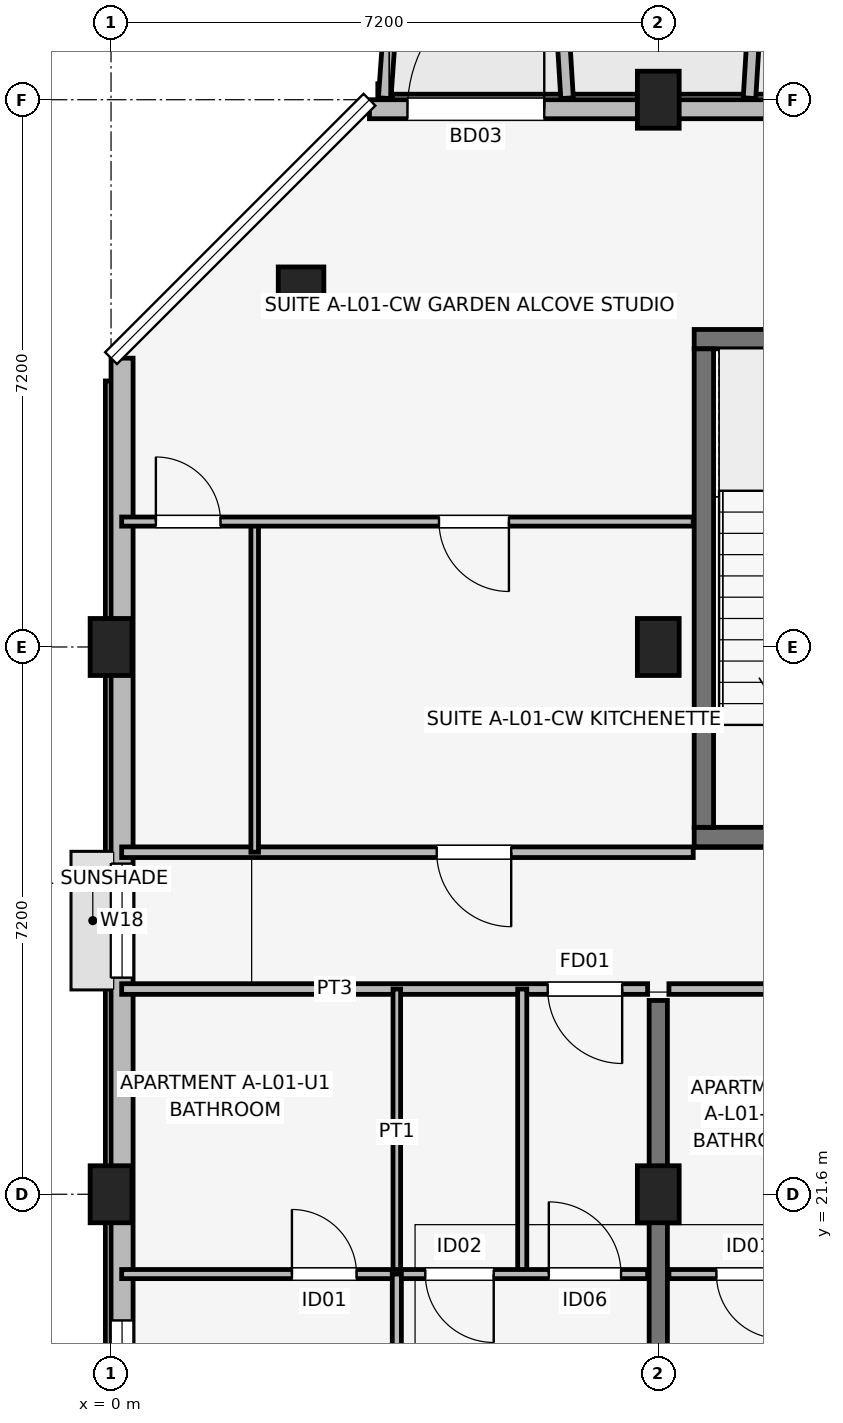
"""IFC4 building model, lengths in metres.
Left out: names, types, materials, properties, quantities, classifications, styles, units other than length and angle.
Written with IfcOpenShell. Run it as: python <this file> out.ifc"""

import sys

from ifc_helpers import new_model, si_unit, direction, frame, frame_2d, origin, origin_2d, place, context, subcontext, project, spatial, rectangle, extrude, element, fill, save


model = new_model("IFC4")
c1 = context("Model", 3, precision=1e-05, world=origin(), true_north=direction((0.0, 1.0)))
c2 = subcontext(c1, "Body", "Model", "MODEL_VIEW")
j1 = project(units=[si_unit("LENGTHUNIT", "METRE"), si_unit("PLANEANGLEUNIT", "RADIAN")], contexts=[c1])
p1 = place(None, origin())
s1 = spatial("IfcSite", under=j1, at=p1, CompositionType="ELEMENT")
p2 = place(p1, origin())
s2 = spatial("IfcBuilding", under=s1, at=p2, CompositionType="ELEMENT")
p3 = place(p2, frame((0.0, 0.0, 4.5)))
s3 = spatial("IfcBuildingStorey", under=s2, at=p3, CompositionType="ELEMENT", Elevation=4.5)
for number, where, z_axis, x_axis in (
    (1, (0.0, 21.6, 0.0), (0.0, 0.0, 1.0), (1.0, 0.0, 0.0)),
    (2, (0.0, 28.8, 0.0), (0.0, 0.0, 1.0), (1.0, 0.0, 0.0)),
):
    element("IfcColumn", number, at=place(p3, frame(where, z_axis=z_axis, x_axis=x_axis)), inside=s3, PredefinedType="COLUMN", context=c2, shape_type="SweptSolid", body=[
        extrude(rectangle(XDim=0.55, YDim=0.75, at=origin_2d()), origin(), (0.0, 0.0, 1.0), 4.2),
    ])
p4 = place(p3, frame((2.5, 33.5, 0.0), z_axis=(0.0, 0.0, 1.0), x_axis=(1.0, 0.0, 0.0)))
e3 = element("IfcColumn", 3, at=p4, inside=s3, PredefinedType="COLUMN", context=c2, shape_type="SweptSolid", body=[
    extrude(rectangle(XDim=0.6, YDim=0.6, at=origin_2d()), origin(), (0.0, 0.0, 1.0), 4.2),
])
for number, where, z_axis, x_axis in (
    (4, (7.2, 21.6, 0.0), (0.0, 0.0, 1.0), (1.0, 0.0, 0.0)),
    (5, (7.2, 28.8, 0.0), (0.0, 0.0, 1.0), (1.0, 0.0, 0.0)),
    (6, (7.2, 36.0, 0.0), (0.0, 0.0, 1.0), (1.0, 0.0, 0.0)),
):
    element("IfcColumn", number, at=place(p3, frame(where, z_axis=z_axis, x_axis=x_axis)), inside=s3, PredefinedType="COLUMN", context=c2, shape_type="SweptSolid", body=[
        extrude(rectangle(XDim=0.55, YDim=0.75, at=origin_2d()), origin(), (0.0, 0.0, 1.0), 4.2),
    ])
p5 = place(p3, frame((7.673, 26.3, 0.0), z_axis=(0.0, 0.0, 1.0), x_axis=(1.0, 0.0, 0.0)))
e7 = element("IfcWall", 7, at=p5, inside=s3, PredefinedType="SHEAR", context=c2, shape_type="SweptSolid", body=[
    extrude(rectangle(XDim=3.305, YDim=0.255, at=frame_2d((1.652, 0.0))), origin(), (0.0, 0.0, 1.0), 4.2),
])
p6 = place(p5, frame((2.177, 0.0, 0.0), z_axis=(0.0, 0.0, 1.0), x_axis=(-1.0, 0.0, 0.0)))
e8 = element("IfcOpeningElement", 8, at=p6, cuts=e7, PredefinedType="OPENING", context=c2, shape_type="SweptSolid", body=[
    extrude(rectangle(XDim=1.05, YDim=2.12, at=frame_2d((0.525, 1.06))), frame((0.0, 0.137, 0.0), z_axis=(0.0, -1.0, 0.0), x_axis=(1.0, 0.0, 0.0)), (0.0, 0.0, 1.0), 0.275),
])
p7 = place(p3, frame((7.673, 32.85, 0.0), z_axis=(0.0, 0.0, 1.0), x_axis=(1.0, 0.0, 0.0)))
e9 = element("IfcWall", 9, at=p7, inside=s3, PredefinedType="SHEAR", context=c2, shape_type="SweptSolid", body=[
    extrude(rectangle(XDim=3.305, YDim=0.255, at=frame_2d((1.652, 0.0))), origin(), (0.0, 0.0, 1.0), 4.2),
])
p8 = place(p3, frame((7.8, 26.427, 0.0), z_axis=(0.0, 0.0, 1.0), x_axis=(0.0, 1.0, 0.0)))
e10 = element("IfcWall", 10, at=p8, inside=s3, PredefinedType="SHEAR", context=c2, shape_type="SweptSolid", body=[
    extrude(rectangle(XDim=6.295, YDim=0.255, at=frame_2d((3.147, 0.0))), origin(), (0.0, 0.0, 1.0), 4.2),
])
p9 = place(p3, frame((7.2, 14.75, 0.0), z_axis=(0.0, 0.0, 1.0), x_axis=(0.0, 1.0, 0.0)))
e11 = element("IfcWall", 11, at=p9, inside=s3, PredefinedType="SHEAR", context=c2, shape_type="SweptSolid", body=[
    extrude(rectangle(XDim=9.4, YDim=0.24, at=frame_2d((4.7, 0.0))), origin(), (0.0, 0.0, 1.0), 4.2),
])
p10 = place(p3, frame((32.6, 35.875, 0.0), z_axis=(0.0, 0.0, 1.0), x_axis=(-1.0, 0.0, 0.0)))
e12 = element("IfcWall", 12, at=p10, inside=s3, PredefinedType="SOLIDWALL", context=c2, shape_type="SweptSolid", body=[
    extrude(rectangle(XDim=29.2, YDim=0.25, at=frame_2d((14.6, 0.0))), origin(), (0.0, 0.0, 1.0), 3.48),
])
p11 = place(p10, frame((28.7, 0.0, 0.0), z_axis=(0.0, 0.0, 1.0), x_axis=(-1.0, 0.0, 0.0)))
e13 = element("IfcOpeningElement", 13, at=p11, cuts=e12, PredefinedType="OPENING", context=c2, shape_type="SweptSolid", body=[
    extrude(rectangle(XDim=1.8, YDim=2.15, at=frame_2d((0.9, 1.075))), frame((0.0, 0.135, 0.0), z_axis=(0.0, -1.0, 0.0), x_axis=(1.0, 0.0, 0.0)), (0.0, 0.0, 1.0), 0.27),
])
p12 = place(p10, frame((2.15, 0.0, 0.0), z_axis=(0.0, 0.0, 1.0), x_axis=(-1.0, 0.0, 0.0)))
e14 = element("IfcOpeningElement", 14, at=p12, cuts=e12, PredefinedType="OPENING", context=c2, shape_type="SweptSolid", body=[
    extrude(rectangle(XDim=1.5, YDim=2.15, at=frame_2d((0.75, 1.075))), frame((0.0, 0.135, 0.0), z_axis=(0.0, -1.0, 0.0), x_axis=(1.0, 0.0, 0.0)), (0.0, 0.0, 1.0), 0.27),
])
p13 = place(p10, frame((14.955, 0.0, 0.5)))
e15 = element("IfcOpeningElement", 15, at=p13, cuts=e12, PredefinedType="OPENING", context=c2, shape_type="SweptSolid", body=[
    extrude(rectangle(XDim=0.9, YDim=1.8, at=frame_2d((0.45, 0.9))), frame((0.0, 0.135, 0.0), z_axis=(0.0, -1.0, 0.0), x_axis=(1.0, 0.0, 0.0)), (0.0, 0.0, 1.0), 0.27),
])
p14 = place(p10, frame((7.675, 0.0, 0.7)))
e16 = element("IfcOpeningElement", 16, at=p14, cuts=e12, PredefinedType="OPENING", context=c2, shape_type="SweptSolid", body=[
    extrude(rectangle(XDim=2.0, YDim=1.65, at=frame_2d((1.0, 0.825))), frame((0.0, 0.135, 0.0), z_axis=(0.0, -1.0, 0.0), x_axis=(1.0, 0.0, 0.0)), (0.0, 0.0, 1.0), 0.27),
])
p15 = place(p10, frame((19.57, 0.0, 0.7)))
e17 = element("IfcOpeningElement", 17, at=p15, cuts=e12, PredefinedType="OPENING", context=c2, shape_type="SweptSolid", body=[
    extrude(rectangle(XDim=1.86, YDim=1.6, at=frame_2d((0.93, 0.8))), frame((0.0, 0.135, 0.0), z_axis=(0.0, -1.0, 0.0), x_axis=(1.0, 0.0, 0.0)), (0.0, 0.0, 1.0), 0.27),
])
p16 = place(p3, frame((0.145, 32.6, 0.0), z_axis=(0.0, 0.0, 1.0), x_axis=(0.0, -1.0, 0.0)))
e18 = element("IfcWall", 18, at=p16, inside=s3, PredefinedType="SOLIDWALL", context=c2, shape_type="SweptSolid", body=[
    extrude(rectangle(XDim=14.8, YDim=0.29, at=frame_2d((7.4, 0.0))), origin(), (0.0, 0.0, 1.0), 3.43),
])
p17 = place(p16, frame((6.65, 0.0, 1.05)))
e19 = element("IfcOpeningElement", 19, at=p17, cuts=e18, PredefinedType="OPENING", context=c2, shape_type="SweptSolid", body=[
    extrude(rectangle(XDim=1.5, YDim=1.15, at=frame_2d((0.75, 0.575))), frame((0.0, 0.155, 0.0), z_axis=(0.0, -1.0, 0.0), x_axis=(1.0, 0.0, 0.0)), (0.0, 0.0, 1.0), 0.31),
])
p18 = place(p16, frame((12.66, 0.0, 0.75)))
e20 = element("IfcOpeningElement", 20, at=p18, cuts=e18, PredefinedType="OPENING", context=c2, shape_type="SweptSolid", body=[
    extrude(rectangle(XDim=1.3, YDim=1.55, at=frame_2d((0.65, 0.775))), frame((0.0, 0.155, 0.0), z_axis=(0.0, -1.0, 0.0), x_axis=(1.0, 0.0, 0.0)), (0.0, 0.0, 1.0), 0.31),
])
p19 = place(p3, frame((3.6, 36.02, 0.0), z_axis=(0.0, 0.0, 1.0), x_axis=(0.071194071069, 0.997462482625, 0.0)))
e21 = element("IfcWall", 21, at=p19, inside=s3, PredefinedType="ELEMENTEDWALL", context=c2, shape_type="SweptSolid", body=[
    extrude(rectangle(XDim=1.965, YDim=0.165, at=frame_2d((0.982, 0.0))), origin(), (0.0, 0.0, 1.0), 4.0),
])
p20 = place(p3, frame((6.0, 36.02, 0.0), z_axis=(0.0, 0.0, 1.0), x_axis=(-0.061170732449, 0.998127317276, 0.0)))
e22 = element("IfcWall", 22, at=p20, inside=s3, PredefinedType="ELEMENTEDWALL", context=c2, shape_type="SweptSolid", body=[
    extrude(rectangle(XDim=1.964, YDim=0.165, at=frame_2d((0.982, 0.0))), origin(), (0.0, 0.0, 1.0), 4.0),
])
p21 = place(p3, frame((8.4, 36.02, 0.0), z_axis=(0.0, 0.0, 1.0), x_axis=(0.061170732449, 0.998127317276, 0.0)))
e23 = element("IfcWall", 23, at=p21, inside=s3, PredefinedType="ELEMENTEDWALL", context=c2, shape_type="SweptSolid", body=[
    extrude(rectangle(XDim=1.964, YDim=0.165, at=frame_2d((0.982, 0.0))), origin(), (0.0, 0.0, 1.0), 3.58),
])
p22 = place(p3, frame((0.14, 24.3, 0.0), z_axis=(0.0, 0.0, 1.0), x_axis=(1.0, 0.0, 0.0)))
e24 = element("IfcWall", 24, at=p22, inside=s3, PredefinedType="PARTITIONING", context=c2, shape_type="SweptSolid", body=[
    extrude(rectangle(XDim=6.92, YDim=0.14, at=frame_2d((3.46, 0.0))), origin(), (0.0, 0.0, 1.0), 3.25),
])
p23 = place(p22, frame((6.585, 0.0, 0.0), z_axis=(0.0, 0.0, 1.0), x_axis=(-1.0, 0.0, 0.0)))
e25 = element("IfcOpeningElement", 25, at=p23, cuts=e24, PredefinedType="OPENING", context=c2, shape_type="SweptSolid", body=[
    extrude(rectangle(XDim=0.98, YDim=2.1, at=frame_2d((0.49, 1.05))), frame((0.0, 0.08, 0.0), z_axis=(0.0, -1.0, 0.0), x_axis=(1.0, 0.0, 0.0)), (0.0, 0.0, 1.0), 0.16),
])
p24 = place(p3, frame((3.76, 20.55, 0.0), z_axis=(0.0, 0.0, 1.0), x_axis=(0.0, 1.0, 0.0)))
e26 = element("IfcWall", 26, at=p24, inside=s3, PredefinedType="PARTITIONING", context=c2, shape_type="SweptSolid", body=[
    extrude(rectangle(XDim=3.75, YDim=0.1, at=frame_2d((1.875, 0.0))), origin(), (0.0, 0.0, 1.0), 3.25),
])
p25 = place(p3, frame((5.41, 20.55, 0.0), z_axis=(0.0, 0.0, 1.0), x_axis=(0.0, 1.0, 0.0)))
e27 = element("IfcWall", 27, at=p25, inside=s3, PredefinedType="PARTITIONING", context=c2, shape_type="SweptSolid", body=[
    extrude(rectangle(XDim=3.75, YDim=0.12, at=frame_2d((1.875, 0.0))), origin(), (0.0, 0.0, 1.0), 3.25),
])
p26 = place(p3, frame((0.14, 20.55, 0.0), z_axis=(0.0, 0.0, 1.0), x_axis=(1.0, 0.0, 0.0)))
e28 = element("IfcWall", 28, at=p26, inside=s3, PredefinedType="PARTITIONING", context=c2, shape_type="SweptSolid", body=[
    extrude(rectangle(XDim=6.92, YDim=0.12, at=frame_2d((3.46, 0.0))), origin(), (0.0, 0.0, 1.0), 3.25),
])
p27 = place(p26, frame((2.24, 0.0, 0.0)))
e29 = element("IfcOpeningElement", 29, at=p27, cuts=e28, PredefinedType="OPENING", context=c2, shape_type="SweptSolid", body=[
    extrude(rectangle(XDim=0.85, YDim=2.08, at=frame_2d((0.425, 1.04))), frame((0.0, 0.07, 0.0), z_axis=(0.0, -1.0, 0.0), x_axis=(1.0, 0.0, 0.0)), (0.0, 0.0, 1.0), 0.14),
])
p28 = place(p26, frame((4.895, 0.0, 0.0), z_axis=(0.0, 0.0, 1.0), x_axis=(-1.0, 0.0, 0.0)))
e30 = element("IfcOpeningElement", 30, at=p28, cuts=e28, PredefinedType="OPENING", context=c2, shape_type="SweptSolid", body=[
    extrude(rectangle(XDim=0.9, YDim=2.08, at=frame_2d((0.45, 1.04))), frame((0.0, 0.07, 0.0), z_axis=(0.0, -1.0, 0.0), x_axis=(1.0, 0.0, 0.0)), (0.0, 0.0, 1.0), 0.14),
])
p29 = place(p26, frame((5.62, 0.0, 0.0)))
e31 = element("IfcOpeningElement", 31, at=p29, cuts=e28, PredefinedType="OPENING", context=c2, shape_type="SweptSolid", body=[
    extrude(rectangle(XDim=0.95, YDim=2.08, at=frame_2d((0.475, 1.04))), frame((0.0, 0.07, 0.0), z_axis=(0.0, -1.0, 0.0), x_axis=(1.0, 0.0, 0.0)), (0.0, 0.0, 1.0), 0.14),
])
p30 = place(p3, frame((3.76, 14.7, 0.0), z_axis=(0.0, 0.0, 1.0), x_axis=(0.0, 1.0, 0.0)))
e32 = element("IfcWall", 32, at=p30, inside=s3, PredefinedType="PARTITIONING", context=c2, shape_type="SweptSolid", body=[
    extrude(rectangle(XDim=5.85, YDim=0.12, at=frame_2d((2.925, 0.0))), origin(), (0.0, 0.0, 1.0), 3.25),
])
p31 = place(p30, frame((3.375, 0.0, 0.0), z_axis=(0.0, 0.0, 1.0), x_axis=(-1.0, 0.0, 0.0)))
e33 = element("IfcOpeningElement", 33, at=p31, cuts=e32, PredefinedType="OPENING", context=c2, shape_type="SweptSolid", body=[
    extrude(rectangle(XDim=0.9, YDim=2.08, at=frame_2d((0.45, 1.04))), frame((0.0, 0.07, 0.0), z_axis=(0.0, -1.0, 0.0), x_axis=(1.0, 0.0, 0.0)), (0.0, 0.0, 1.0), 0.14),
])
p32 = place(p3, frame((7.34, 24.3, 0.0), z_axis=(0.0, 0.0, 1.0), x_axis=(1.0, 0.0, 0.0)))
e34 = element("IfcWall", 34, at=p32, inside=s3, PredefinedType="PARTITIONING", context=c2, shape_type="SweptSolid", body=[
    extrude(rectangle(XDim=6.92, YDim=0.14, at=frame_2d((3.46, 0.0))), origin(), (0.0, 0.0, 1.0), 3.25),
])
p33 = place(p32, frame((4.995, 0.0, 0.0)))
e35 = element("IfcOpeningElement", 35, at=p33, cuts=e34, PredefinedType="OPENING", context=c2, shape_type="SweptSolid", body=[
    extrude(rectangle(XDim=0.98, YDim=2.1, at=frame_2d((0.49, 1.05))), frame((0.0, 0.08, 0.0), z_axis=(0.0, -1.0, 0.0), x_axis=(1.0, 0.0, 0.0)), (0.0, 0.0, 1.0), 0.16),
])
p34 = place(p3, frame((7.34, 20.55, 0.0), z_axis=(0.0, 0.0, 1.0), x_axis=(1.0, 0.0, 0.0)))
e36 = element("IfcWall", 36, at=p34, inside=s3, PredefinedType="PARTITIONING", context=c2, shape_type="SweptSolid", body=[
    extrude(rectangle(XDim=6.92, YDim=0.12, at=frame_2d((3.46, 0.0))), origin(), (0.0, 0.0, 1.0), 3.25),
])
p35 = place(p34, frame((1.475, 0.0, 0.0), z_axis=(0.0, 0.0, 1.0), x_axis=(-1.0, 0.0, 0.0)))
e37 = element("IfcOpeningElement", 37, at=p35, cuts=e36, PredefinedType="OPENING", context=c2, shape_type="SweptSolid", body=[
    extrude(rectangle(XDim=0.85, YDim=2.08, at=frame_2d((0.425, 1.04))), frame((0.0, 0.07, 0.0), z_axis=(0.0, -1.0, 0.0), x_axis=(1.0, 0.0, 0.0)), (0.0, 0.0, 1.0), 0.14),
])
p36 = place(p34, frame((2.625, 0.0, 0.0)))
e38 = element("IfcOpeningElement", 38, at=p36, cuts=e36, PredefinedType="OPENING", context=c2, shape_type="SweptSolid", body=[
    extrude(rectangle(XDim=0.9, YDim=2.08, at=frame_2d((0.45, 1.04))), frame((0.0, 0.07, 0.0), z_axis=(0.0, -1.0, 0.0), x_axis=(1.0, 0.0, 0.0)), (0.0, 0.0, 1.0), 0.14),
])
p37 = place(p34, frame((5.96, 0.0, 0.0), z_axis=(0.0, 0.0, 1.0), x_axis=(-1.0, 0.0, 0.0)))
e39 = element("IfcOpeningElement", 39, at=p37, cuts=e36, PredefinedType="OPENING", context=c2, shape_type="SweptSolid", body=[
    extrude(rectangle(XDim=0.95, YDim=2.08, at=frame_2d((0.475, 1.04))), frame((0.0, 0.07, 0.0), z_axis=(0.0, -1.0, 0.0), x_axis=(1.0, 0.0, 0.0)), (0.0, 0.0, 1.0), 0.14),
])
p38 = place(p3, frame((0.14, 26.1, 0.0), z_axis=(0.0, 0.0, 1.0), x_axis=(1.0, 0.0, 0.0)))
e40 = element("IfcWall", 40, at=p38, inside=s3, PredefinedType="PARTITIONING", context=c2, shape_type="SweptSolid", body=[
    extrude(rectangle(XDim=7.52, YDim=0.14, at=frame_2d((3.76, 0.0))), origin(), (0.0, 0.0, 1.0), 3.25),
])
p39 = place(p38, frame((5.125, 0.0, 0.0), z_axis=(0.0, 0.0, 1.0), x_axis=(-1.0, 0.0, 0.0)))
e41 = element("IfcOpeningElement", 41, at=p39, cuts=e40, PredefinedType="OPENING", context=c2, shape_type="SweptSolid", body=[
    extrude(rectangle(XDim=0.98, YDim=2.1, at=frame_2d((0.49, 1.05))), frame((0.0, 0.08, 0.0), z_axis=(0.0, -1.0, 0.0), x_axis=(1.0, 0.0, 0.0)), (0.0, 0.0, 1.0), 0.16),
])
p40 = place(p3, frame((1.89, 26.1, 0.0), z_axis=(0.0, 0.0, 1.0), x_axis=(0.0, 1.0, 0.0)))
e42 = element("IfcWall", 42, at=p40, inside=s3, PredefinedType="PARTITIONING", context=c2, shape_type="SweptSolid", body=[
    extrude(rectangle(XDim=4.35, YDim=0.1, at=frame_2d((2.175, 0.0))), origin(), (0.0, 0.0, 1.0), 3.25),
])
p41 = place(p3, frame((0.14, 30.45, 0.0), z_axis=(0.0, 0.0, 1.0), x_axis=(1.0, 0.0, 0.0)))
e43 = element("IfcWall", 43, at=p41, inside=s3, PredefinedType="PARTITIONING", context=c2, shape_type="SweptSolid", body=[
    extrude(rectangle(XDim=7.52, YDim=0.12, at=frame_2d((3.76, 0.0))), origin(), (0.0, 0.0, 1.0), 3.25),
])
p42 = place(p41, frame((0.45, 0.0, 0.0)))
e44 = element("IfcOpeningElement", 44, at=p42, cuts=e43, PredefinedType="OPENING", context=c2, shape_type="SweptSolid", body=[
    extrude(rectangle(XDim=0.85, YDim=2.08, at=frame_2d((0.425, 1.04))), frame((0.0, 0.07, 0.0), z_axis=(0.0, -1.0, 0.0), x_axis=(1.0, 0.0, 0.0)), (0.0, 0.0, 1.0), 0.14),
])
p43 = place(p41, frame((5.095, 0.0, 0.0), z_axis=(0.0, 0.0, 1.0), x_axis=(-1.0, 0.0, 0.0)))
e45 = element("IfcOpeningElement", 45, at=p43, cuts=e43, PredefinedType="OPENING", context=c2, shape_type="SweptSolid", body=[
    extrude(rectangle(XDim=0.92, YDim=2.08, at=frame_2d((0.46, 1.04))), frame((0.0, 0.07, 0.0), z_axis=(0.0, -1.0, 0.0), x_axis=(1.0, 0.0, 0.0)), (0.0, 0.0, 1.0), 0.14),
])
p44 = place(p11, origin())
e46 = element("IfcDoor", 46, at=p44, inside=s3, OperationType="SINGLE_SWING_LEFT", PredefinedType="DOOR", context=c2, shape_type="SweptSolid", body=[
    extrude(rectangle(XDim=1.8, YDim=2.15, at=frame_2d((0.9, 1.075))), frame((0.0, 0.025, 0.0), z_axis=(0.0, -1.0, 0.0), x_axis=(1.0, 0.0, 0.0)), (0.0, 0.0, 1.0), 0.05),
])
fill(e13, e46)
p45 = place(p17, origin())
e47 = element("IfcWindow", 47, at=p45, inside=s3, PartitioningType="SINGLE_PANEL", PredefinedType="WINDOW", context=c2, shape_type="SweptSolid", body=[
    extrude(rectangle(XDim=1.5, YDim=1.15, at=frame_2d((0.75, 0.575))), frame((0.0, 0.03, 0.0), z_axis=(0.0, -1.0, 0.0), x_axis=(1.0, 0.0, 0.0)), (0.0, 0.0, 1.0), 0.06),
])
fill(e19, e47)
p46 = place(p18, origin())
e48 = element("IfcWindow", 48, at=p46, inside=s3, PartitioningType="SINGLE_PANEL", PredefinedType="WINDOW", context=c2, shape_type="SweptSolid", body=[
    extrude(rectangle(XDim=1.3, YDim=1.55, at=frame_2d((0.65, 0.775))), frame((0.0, 0.03, 0.0), z_axis=(0.0, -1.0, 0.0), x_axis=(1.0, 0.0, 0.0)), (0.0, 0.0, 1.0), 0.06),
])
fill(e20, e48)
p47 = place(p23, origin())
e49 = element("IfcDoor", 49, at=p47, inside=s3, OperationType="SINGLE_SWING_RIGHT", PredefinedType="DOOR", context=c2, shape_type="SweptSolid", body=[
    extrude(rectangle(XDim=0.98, YDim=2.1, at=frame_2d((0.49, 1.05))), frame((0.0, 0.025, 0.0), z_axis=(0.0, -1.0, 0.0), x_axis=(1.0, 0.0, 0.0)), (0.0, 0.0, 1.0), 0.05),
])
fill(e25, e49)
p48 = place(p27, origin())
e50 = element("IfcDoor", 50, at=p48, inside=s3, OperationType="SINGLE_SWING_LEFT", PredefinedType="DOOR", context=c2, shape_type="SweptSolid", body=[
    extrude(rectangle(XDim=0.85, YDim=2.08, at=frame_2d((0.425, 1.04))), frame((0.0, 0.025, 0.0), z_axis=(0.0, -1.0, 0.0), x_axis=(1.0, 0.0, 0.0)), (0.0, 0.0, 1.0), 0.05),
])
fill(e29, e50)
p49 = place(p28, origin())
e51 = element("IfcDoor", 51, at=p49, inside=s3, OperationType="SINGLE_SWING_RIGHT", PredefinedType="DOOR", context=c2, shape_type="SweptSolid", body=[
    extrude(rectangle(XDim=0.9, YDim=2.08, at=frame_2d((0.45, 1.04))), frame((0.0, 0.025, 0.0), z_axis=(0.0, -1.0, 0.0), x_axis=(1.0, 0.0, 0.0)), (0.0, 0.0, 1.0), 0.05),
])
fill(e30, e51)
p50 = place(p29, origin())
e52 = element("IfcDoor", 52, at=p50, inside=s3, OperationType="SINGLE_SWING_LEFT", PredefinedType="DOOR", context=c2, shape_type="SweptSolid", body=[
    extrude(rectangle(XDim=0.95, YDim=2.08, at=frame_2d((0.475, 1.04))), frame((0.0, 0.025, 0.0), z_axis=(0.0, -1.0, 0.0), x_axis=(1.0, 0.0, 0.0)), (0.0, 0.0, 1.0), 0.05),
])
fill(e31, e52)
p51 = place(p35, origin())
e53 = element("IfcDoor", 53, at=p51, inside=s3, OperationType="SINGLE_SWING_RIGHT", PredefinedType="DOOR", context=c2, shape_type="SweptSolid", body=[
    extrude(rectangle(XDim=0.85, YDim=2.08, at=frame_2d((0.425, 1.04))), frame((0.0, 0.025, 0.0), z_axis=(0.0, -1.0, 0.0), x_axis=(1.0, 0.0, 0.0)), (0.0, 0.0, 1.0), 0.05),
])
fill(e37, e53)
p52 = place(p39, origin())
e54 = element("IfcDoor", 54, at=p52, inside=s3, OperationType="SINGLE_SWING_RIGHT", PredefinedType="DOOR", context=c2, shape_type="SweptSolid", body=[
    extrude(rectangle(XDim=0.98, YDim=2.1, at=frame_2d((0.49, 1.05))), frame((0.0, 0.025, 0.0), z_axis=(0.0, -1.0, 0.0), x_axis=(1.0, 0.0, 0.0)), (0.0, 0.0, 1.0), 0.05),
])
fill(e41, e54)
p53 = place(p42, origin())
e55 = element("IfcDoor", 55, at=p53, inside=s3, OperationType="SINGLE_SWING_LEFT", PredefinedType="DOOR", context=c2, shape_type="SweptSolid", body=[
    extrude(rectangle(XDim=0.85, YDim=2.08, at=frame_2d((0.425, 1.04))), frame((0.0, 0.025, 0.0), z_axis=(0.0, -1.0, 0.0), x_axis=(1.0, 0.0, 0.0)), (0.0, 0.0, 1.0), 0.05),
])
fill(e44, e55)
p54 = place(p43, origin())
e56 = element("IfcDoor", 56, at=p54, inside=s3, OperationType="SINGLE_SWING_RIGHT", PredefinedType="DOOR", context=c2, shape_type="SweptSolid", body=[
    extrude(rectangle(XDim=0.92, YDim=2.08, at=frame_2d((0.46, 1.04))), frame((0.0, 0.025, 0.0), z_axis=(0.0, -1.0, 0.0), x_axis=(1.0, 0.0, 0.0)), (0.0, 0.0, 1.0), 0.05),
])
fill(e45, e56)
save(model, sys.argv[1])
